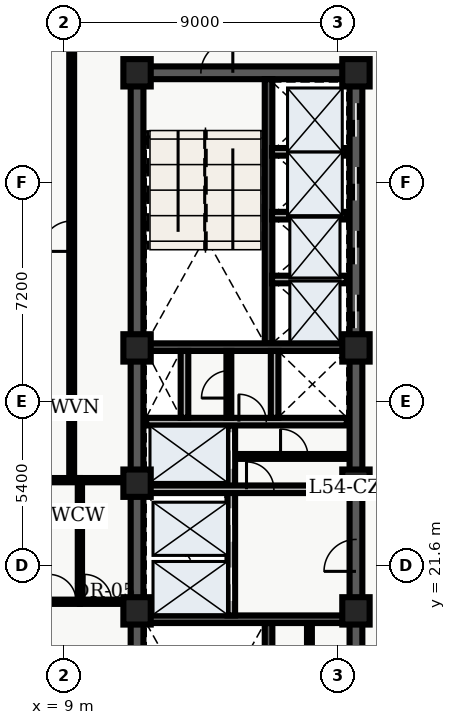
"""IFC4 building model, lengths in metres.
Left out: names, types, materials, properties, quantities, classifications, styles, units other than length and angle.
Written with IfcOpenShell. Run it as: python <this file> out.ifc"""

import sys

from ifc_helpers import new_model, entity, si_unit, converted_unit, direction, frame, origin_with_axes, origin_2d_with_axis, place, context, subcontext, project, spatial, polyline, rectangle, outline, extrude, element, fill, save


model = new_model("IFC4")
c1 = context("Model", 3, precision=1e-05, world=origin_with_axes(), true_north=direction((0.0, 1.0)))
c2 = subcontext(c1, "Body", "Model", "MODEL_VIEW")
j1 = project(units=[si_unit("LENGTHUNIT", "METRE"), converted_unit("PLANEANGLEUNIT", "DEGREE", entity("IfcPlaneAngleMeasure", 0.017), si_unit("PLANEANGLEUNIT", "RADIAN"), dimensions=[0, 0, 0, 0, 0, 0, 0])], contexts=[c1])
p1 = place(None, origin_with_axes())
s1 = spatial("IfcSite", under=j1, at=p1, CompositionType="ELEMENT")
p2 = place(p1, origin_with_axes())
s2 = spatial("IfcBuilding", under=s1, at=p2, CompositionType="ELEMENT")
p3 = place(p2, frame((0.0, 0.0, 219.9), z_axis=(0.0, 0.0, 1.0), x_axis=(1.0, 0.0, 0.0)))
s3 = spatial("IfcBuildingStorey", under=s2, at=p3, CompositionType="ELEMENT", Elevation=219.9)
p4 = place(p3, frame((11.4, 10.8, 0.0), z_axis=(0.0, 0.0, 1.0), x_axis=(0.0, 1.0, 0.0)))
e1 = element("IfcWall", 1, at=p4, inside=s3, PredefinedType="SHEAR", context=c2, shape_type="SweptSolid", body=[
    extrude(outline(polyline([(0.0, -0.21), (27.0, -0.21), (27.0, 0.21), (0.0, 0.21), (0.0, -0.21)])), origin_with_axes(), (0.0, 0.0, 1.0), 4.56),
])
p5 = place(p3, frame((11.4, 37.8, 0.0), z_axis=(0.0, 0.0, 1.0), x_axis=(1.0, 0.0, 0.0)))
e2 = element("IfcWall", 2, at=p5, inside=s3, PredefinedType="SHEAR", context=c2, shape_type="SweptSolid", body=[
    extrude(outline(polyline([(0.0, -0.21), (7.2, -0.21), (7.2, 0.21), (0.0, 0.21), (0.0, -0.21)])), origin_with_axes(), (0.0, 0.0, 1.0), 4.56),
])
p6 = place(p5, frame((2.625, 0.0, 0.0), z_axis=(0.0, 0.0, 1.0), x_axis=(1.0, 0.0, 0.0)))
e3 = element("IfcOpeningElement", 3, at=p6, cuts=e2, PredefinedType="OPENING", context=c2, shape_type="SweptSolid", body=[
    extrude(rectangle(XDim=1.05, YDim=0.44, at=origin_2d_with_axis()), origin_with_axes(), (0.0, 0.0, 1.0), 2.15),
])
p7 = place(p3, frame((18.6, 10.8, 0.0), z_axis=(0.0, 0.0, 1.0), x_axis=(0.0, 1.0, 0.0)))
e4 = element("IfcWall", 4, at=p7, inside=s3, PredefinedType="SHEAR", context=c2, shape_type="SweptSolid", body=[
    extrude(outline(polyline([(0.0, -0.21), (13.5, -0.21), (13.5, 0.21), (0.0, 0.21), (0.0, -0.21)])), origin_with_axes(), (0.0, 0.0, 1.0), 4.56),
])
p8 = place(p7, frame((1.3, 0.0, 0.0), z_axis=(0.0, 0.0, 1.0), x_axis=(1.0, 0.0, 0.0)))
e5 = element("IfcOpeningElement", 5, at=p8, cuts=e4, PredefinedType="OPENING", context=c2, shape_type="SweptSolid", body=[
    extrude(rectangle(XDim=1.1, YDim=0.44, at=origin_2d_with_axis()), origin_with_axes(), (0.0, 0.0, 1.0), 2.15),
])
p9 = place(p7, frame((3.4, 0.0, 0.0), z_axis=(0.0, 0.0, 1.0), x_axis=(1.0, 0.0, 0.0)))
e6 = element("IfcOpeningElement", 6, at=p9, cuts=e4, PredefinedType="OPENING", context=c2, shape_type="SweptSolid", body=[
    extrude(rectangle(XDim=1.1, YDim=0.44, at=origin_2d_with_axis()), origin_with_axes(), (0.0, 0.0, 1.0), 2.15),
])
p10 = place(p7, frame((11.125, 0.0, 0.0), z_axis=(0.0, 0.0, 1.0), x_axis=(1.0, 0.0, 0.0)))
e7 = element("IfcOpeningElement", 7, at=p10, cuts=e4, PredefinedType="OPENING", context=c2, shape_type="SweptSolid", body=[
    extrude(rectangle(XDim=1.05, YDim=0.44, at=origin_2d_with_axis()), origin_with_axes(), (0.0, 0.0, 1.0), 2.15),
])
p11 = place(p7, frame((6.675, 0.0, 0.0), z_axis=(0.0, 0.0, 1.0), x_axis=(1.0, 0.0, 0.0)))
e8 = element("IfcOpeningElement", 8, at=p11, cuts=e4, PredefinedType="OPENING", context=c2, shape_type="SweptSolid", body=[
    extrude(rectangle(XDim=0.95, YDim=0.44, at=origin_2d_with_axis()), origin_with_axes(), (0.0, 0.0, 1.0), 2.15),
])
p12 = place(p3, frame((18.6, 24.3, 0.0), z_axis=(0.0, 0.0, 1.0), x_axis=(0.0, 1.0, 0.0)))
e9 = element("IfcWall", 9, at=p12, inside=s3, PredefinedType="SHEAR", context=c2, shape_type="SweptSolid", body=[
    extrude(outline(polyline([(0.0, -0.21), (13.5, -0.21), (13.5, 0.21), (0.0, 0.21), (0.0, -0.21)])), origin_with_axes(), (0.0, 0.0, 1.0), 4.56),
])
p13 = place(p12, frame((5.65, 0.0, 0.0), z_axis=(0.0, 0.0, 1.0), x_axis=(1.0, 0.0, 0.0)))
e10 = element("IfcOpeningElement", 10, at=p13, cuts=e9, PredefinedType="OPENING", context=c2, shape_type="SweptSolid", body=[
    extrude(rectangle(XDim=1.1, YDim=0.44, at=origin_2d_with_axis()), origin_with_axes(), (0.0, 0.0, 1.0), 2.15),
])
p14 = place(p12, frame((7.75, 0.0, 0.0), z_axis=(0.0, 0.0, 1.0), x_axis=(1.0, 0.0, 0.0)))
e11 = element("IfcOpeningElement", 11, at=p14, cuts=e9, PredefinedType="OPENING", context=c2, shape_type="SweptSolid", body=[
    extrude(rectangle(XDim=1.1, YDim=0.44, at=origin_2d_with_axis()), origin_with_axes(), (0.0, 0.0, 1.0), 2.15),
])
p15 = place(p12, frame((9.85, 0.0, 0.0), z_axis=(0.0, 0.0, 1.0), x_axis=(1.0, 0.0, 0.0)))
e12 = element("IfcOpeningElement", 12, at=p15, cuts=e9, PredefinedType="OPENING", context=c2, shape_type="SweptSolid", body=[
    extrude(rectangle(XDim=1.1, YDim=0.44, at=origin_2d_with_axis()), origin_with_axes(), (0.0, 0.0, 1.0), 2.15),
])
p16 = place(p12, frame((11.95, 0.0, 0.0), z_axis=(0.0, 0.0, 1.0), x_axis=(1.0, 0.0, 0.0)))
e13 = element("IfcOpeningElement", 13, at=p16, cuts=e9, PredefinedType="OPENING", context=c2, shape_type="SweptSolid", body=[
    extrude(rectangle(XDim=1.1, YDim=0.44, at=origin_2d_with_axis()), origin_with_axes(), (0.0, 0.0, 1.0), 2.15),
])
p17 = place(p3, frame((15.725, 11.01, 0.0), z_axis=(0.0, 0.0, 1.0), x_axis=(0.0, 1.0, 0.0)))
e14 = element("IfcWall", 14, at=p17, inside=s3, PredefinedType="SHEAR", context=c2, shape_type="SweptSolid", body=[
    extrude(outline(polyline([(0.0, -0.125), (8.69, -0.125), (8.69, 0.125), (0.0, 0.125), (0.0, -0.125)])), origin_with_axes(), (0.0, 0.0, 1.0), 4.56),
])
p18 = place(p3, frame((11.61, 19.825, 0.0), z_axis=(0.0, 0.0, 1.0), x_axis=(1.0, 0.0, 0.0)))
e15 = element("IfcWall", 15, at=p18, inside=s3, PredefinedType="SHEAR", context=c2, shape_type="SweptSolid", body=[
    extrude(outline(polyline([(0.0, -0.125), (6.78, -0.125), (6.78, 0.125), (0.0, 0.125), (0.0, -0.125)])), origin_with_axes(), (0.0, 0.0, 1.0), 4.56),
])
p19 = place(p3, frame((15.725, 28.9, 0.0), z_axis=(0.0, 0.0, 1.0), x_axis=(0.0, 1.0, 0.0)))
e16 = element("IfcWall", 16, at=p19, inside=s3, PredefinedType="SHEAR", context=c2, shape_type="SweptSolid", body=[
    extrude(outline(polyline([(0.0, -0.125), (8.69, -0.125), (8.69, 0.125), (0.0, 0.125), (0.0, -0.125)])), origin_with_axes(), (0.0, 0.0, 1.0), 4.56),
])
p20 = place(p3, frame((11.61, 28.775, 0.0), z_axis=(0.0, 0.0, 1.0), x_axis=(1.0, 0.0, 0.0)))
e17 = element("IfcWall", 17, at=p20, inside=s3, PredefinedType="SHEAR", context=c2, shape_type="SweptSolid", body=[
    extrude(outline(polyline([(0.0, -0.125), (6.78, -0.125), (6.78, 0.125), (0.0, 0.125), (0.0, -0.125)])), origin_with_axes(), (0.0, 0.0, 1.0), 4.56),
])
p21 = place(p3, frame((14.5, 19.95, 0.0), z_axis=(0.0, 0.0, 1.0), x_axis=(0.0, 1.0, 0.0)))
e18 = element("IfcWall", 18, at=p21, inside=s3, PredefinedType="SOLIDWALL", context=c2, shape_type="SweptSolid", body=[
    extrude(outline(polyline([(0.0, -0.125), (6.25, -0.125), (6.25, 0.125), (0.0, 0.125), (0.0, -0.125)])), origin_with_axes(), (0.0, 0.0, 1.0), 3.6),
])
p22 = place(p21, frame((1.025, 0.0, 0.0), z_axis=(0.0, 0.0, 1.0), x_axis=(1.0, 0.0, 0.0)))
e19 = element("IfcOpeningElement", 19, at=p22, cuts=e18, PredefinedType="OPENING", context=c2, shape_type="SweptSolid", body=[
    extrude(rectangle(XDim=1.1, YDim=0.27, at=origin_2d_with_axis()), origin_with_axes(), (0.0, 0.0, 1.0), 2.15),
])
p23 = place(p21, frame((2.975, 0.0, 0.0), z_axis=(0.0, 0.0, 1.0), x_axis=(1.0, 0.0, 0.0)))
e20 = element("IfcOpeningElement", 20, at=p23, cuts=e18, PredefinedType="OPENING", context=c2, shape_type="SweptSolid", body=[
    extrude(rectangle(XDim=1.1, YDim=0.27, at=origin_2d_with_axis()), origin_with_axes(), (0.0, 0.0, 1.0), 2.15),
])
p24 = place(p21, frame((5.425, 0.0, 0.0), z_axis=(0.0, 0.0, 1.0), x_axis=(1.0, 0.0, 0.0)))
e21 = element("IfcOpeningElement", 21, at=p24, cuts=e18, PredefinedType="OPENING", context=c2, shape_type="SweptSolid", body=[
    extrude(rectangle(XDim=1.2, YDim=0.27, at=origin_2d_with_axis()), origin_with_axes(), (0.0, 0.0, 1.0), 2.15),
])
p25 = place(p3, frame((11.7, 24.1, 0.0), z_axis=(0.0, 0.0, 1.0), x_axis=(1.0, 0.0, 0.0)))
e22 = element("IfcWall", 22, at=p25, inside=s3, PredefinedType="SOLIDWALL", context=c2, shape_type="SweptSolid", body=[
    extrude(outline(polyline([(0.0, -0.125), (6.6, -0.125), (6.6, 0.125), (0.0, 0.125), (0.0, -0.125)])), origin_with_axes(), (0.0, 0.0, 1.0), 3.6),
])
p26 = place(p25, frame((3.75, 0.0, 0.0), z_axis=(0.0, 0.0, 1.0), x_axis=(1.0, 0.0, 0.0)))
e23 = element("IfcOpeningElement", 23, at=p26, cuts=e22, PredefinedType="OPENING", context=c2, shape_type="SweptSolid", body=[
    extrude(rectangle(XDim=0.9, YDim=0.27, at=origin_2d_with_axis()), origin_with_axes(), (0.0, 0.0, 1.0), 2.15),
])
p27 = place(p3, frame((11.7, 26.325, 0.0), z_axis=(0.0, 0.0, 1.0), x_axis=(1.0, 0.0, 0.0)))
e24 = element("IfcWall", 24, at=p27, inside=s3, PredefinedType="SOLIDWALL", context=c2, shape_type="SweptSolid", body=[
    extrude(outline(polyline([(0.0, -0.125), (6.6, -0.125), (6.6, 0.125), (0.0, 0.125), (0.0, -0.125)])), origin_with_axes(), (0.0, 0.0, 1.0), 3.6),
])
p28 = place(p27, frame((3.5, 0.0, 0.0), z_axis=(0.0, 0.0, 1.0), x_axis=(1.0, 0.0, 0.0)))
e25 = element("IfcOpeningElement", 25, at=p28, cuts=e24, PredefinedType="OPENING", context=c2, shape_type="SweptSolid", body=[
    extrude(rectangle(XDim=0.9, YDim=0.27, at=origin_2d_with_axis()), origin_with_axes(), (0.0, 0.0, 1.0), 2.15),
])
for number, where, z_axis, x_axis in (
    (26, (12.96, 26.45, 0.0), (0.0, 0.0, 1.0), (0.0, 1.0, 0.0)),
    (27, (15.925, 26.45, 0.0), (0.0, 0.0, 1.0), (0.0, 1.0, 0.0)),
):
    element("IfcWall", number, at=place(p3, frame(where, z_axis=z_axis, x_axis=x_axis)), inside=s3, PredefinedType="SOLIDWALL", context=c2, shape_type="SweptSolid", body=[
        extrude(outline(polyline([(0.0, -0.125), (2.2, -0.125), (2.2, 0.125), (0.0, 0.125), (0.0, -0.125)])), origin_with_axes(), (0.0, 0.0, 1.0), 3.6),
    ])
for number, where, z_axis, x_axis in (
    (28, (11.4, 20.1, 0.0), (0.0, 0.0, 1.0), (1.0, 0.0, 0.0)),
    (29, (11.4, 24.3, 0.0), (0.0, 0.0, 1.0), (1.0, 0.0, 0.0)),
    (30, (11.4, 28.75, 0.0), (0.0, 0.0, 1.0), (1.0, 0.0, 0.0)),
    (31, (11.4, 37.8, 0.0), (0.0, 0.0, 1.0), (1.0, 0.0, 0.0)),
    (32, (18.6, 20.1, 0.0), (0.0, 0.0, 1.0), (1.0, 0.0, 0.0)),
    (33, (18.6, 24.3, 0.0), (0.0, 0.0, 1.0), (1.0, 0.0, 0.0)),
    (34, (18.6, 28.75, 0.0), (0.0, 0.0, 1.0), (1.0, 0.0, 0.0)),
    (35, (18.6, 37.8, 0.0), (0.0, 0.0, 1.0), (1.0, 0.0, 0.0)),
):
    element("IfcColumn", number, at=place(p3, frame(where, z_axis=z_axis, x_axis=x_axis)), inside=s3, PredefinedType="COLUMN", context=c2, shape_type="SweptSolid", body=[
        extrude(rectangle(XDim=0.9, YDim=0.9, at=origin_2d_with_axis()), origin_with_axes(), (0.0, 0.0, 1.0), 4.8),
    ])
p29 = place(p3, frame((14.62, 25.18, 0.0), z_axis=(0.0, 0.0, 1.0), x_axis=(1.0, 0.0, 0.0)))
e36 = element("IfcWall", 36, at=p29, inside=s3, PredefinedType="PARTITIONING", context=c2, shape_type="SweptSolid", body=[
    extrude(outline(polyline([(0.0, -0.08), (3.68, -0.08), (3.68, 0.08), (0.0, 0.08), (0.0, -0.08)])), origin_with_axes(), (0.0, 0.0, 1.0), 3.2),
])
p30 = place(p29, frame((1.95, 0.0, 0.0), z_axis=(0.0, 0.0, 1.0), x_axis=(1.0, 0.0, 0.0)))
e37 = element("IfcOpeningElement", 37, at=p30, cuts=e36, PredefinedType="OPENING", context=c2, shape_type="SweptSolid", body=[
    extrude(rectangle(XDim=0.9, YDim=0.18, at=origin_2d_with_axis()), origin_with_axes(), (0.0, 0.0, 1.0), 2.15),
])
p31 = place(p3, frame((14.42, 26.45, 0.0), z_axis=(0.0, 0.0, 1.0), x_axis=(0.0, 1.0, 0.0)))
e38 = element("IfcWall", 38, at=p31, inside=s3, PredefinedType="PARTITIONING", context=c2, shape_type="SweptSolid", body=[
    extrude(outline(polyline([(0.0, -0.08), (2.2, -0.08), (2.2, 0.08), (0.0, 0.08), (0.0, -0.08)])), origin_with_axes(), (0.0, 0.0, 1.0), 3.2),
])
p32 = place(p31, frame((1.1, 0.0, 0.0), z_axis=(0.0, 0.0, 1.0), x_axis=(1.0, 0.0, 0.0)))
e39 = element("IfcOpeningElement", 39, at=p32, cuts=e38, PredefinedType="OPENING", context=c2, shape_type="SweptSolid", body=[
    extrude(rectangle(XDim=0.9, YDim=0.18, at=origin_2d_with_axis()), origin_with_axes(), (0.0, 0.0, 1.0), 2.15),
])
p33 = place(p3, frame((17.07, 15.34, 0.0), z_axis=(0.0, 0.0, 1.0), x_axis=(0.0, 1.0, 0.0)))
e40 = element("IfcWall", 40, at=p33, inside=s3, PredefinedType="PARTITIONING", context=c2, shape_type="SweptSolid", body=[
    extrude(outline(polyline([(0.0, -0.08), (4.36, -0.08), (4.36, 0.08), (0.0, 0.08), (0.0, -0.08)])), origin_with_axes(), (0.0, 0.0, 1.0), 3.2),
])
p34 = place(p33, frame((2.05, 0.0, 0.0), z_axis=(0.0, 0.0, 1.0), x_axis=(1.0, 0.0, 0.0)))
e41 = element("IfcOpeningElement", 41, at=p34, cuts=e40, PredefinedType="OPENING", context=c2, shape_type="SweptSolid", body=[
    extrude(rectangle(XDim=0.9, YDim=0.18, at=origin_2d_with_axis()), origin_with_axes(), (0.0, 0.0, 1.0), 2.15),
])
for number, where, z_axis, x_axis in (
    (42, (15.84, 31.0, 0.0), (0.0, 0.0, 1.0), (1.0, 0.0, 0.0)),
    (43, (15.84, 33.1, 0.0), (0.0, 0.0, 1.0), (1.0, 0.0, 0.0)),
    (44, (15.84, 35.2, 0.0), (0.0, 0.0, 1.0), (1.0, 0.0, 0.0)),
):
    element("IfcWall", number, at=place(p3, frame(where, z_axis=z_axis, x_axis=x_axis)), inside=s3, PredefinedType="SOLIDWALL", context=c2, shape_type="SweptSolid", body=[
        extrude(outline(polyline([(0.0, -0.125), (2.46, -0.125), (2.46, 0.125), (0.0, 0.125), (0.0, -0.125)])), origin_with_axes(), (0.0, 0.0, 1.0), 3.2),
    ])
p35 = place(p3, frame((9.52, 20.4, 0.0), z_axis=(0.0, 0.0, 1.0), x_axis=(0.0, 1.0, 0.0)))
e45 = element("IfcWall", 45, at=p35, inside=s3, PredefinedType="PARTITIONING", context=c2, shape_type="SweptSolid", body=[
    extrude(outline(polyline([(0.0, -0.07), (4.0, -0.07), (4.0, 0.07), (0.0, 0.07), (0.0, -0.07)])), origin_with_axes(), (0.0, 0.0, 1.0), 3.2),
])
p36 = place(p3, frame((9.52, 20.4, 0.0), z_axis=(0.0, 0.0, 1.0), x_axis=(1.0, 0.0, 0.0)))
e46 = element("IfcWall", 46, at=p36, inside=s3, PredefinedType="PARTITIONING", context=c2, shape_type="SweptSolid", body=[
    extrude(outline(polyline([(0.0, -0.07), (1.58, -0.07), (1.58, 0.07), (0.0, 0.07), (0.0, -0.07)])), origin_with_axes(), (0.0, 0.0, 1.0), 3.2),
])
p37 = place(p36, frame((0.59, 0.0, 0.0), z_axis=(0.0, 0.0, 1.0), x_axis=(1.0, 0.0, 0.0)))
e47 = element("IfcOpeningElement", 47, at=p37, cuts=e46, PredefinedType="OPENING", context=c2, shape_type="SweptSolid", body=[
    extrude(rectangle(XDim=0.9, YDim=0.16, at=origin_2d_with_axis()), origin_with_axes(), (0.0, 0.0, 1.0), 2.15),
])
p38 = place(p3, frame((9.52, 24.4, 0.0), z_axis=(0.0, 0.0, 1.0), x_axis=(1.0, 0.0, 0.0)))
e48 = element("IfcWall", 48, at=p38, inside=s3, PredefinedType="PARTITIONING", context=c2, shape_type="SweptSolid", body=[
    extrude(outline(polyline([(0.0, -0.07), (1.58, -0.07), (1.58, 0.07), (0.0, 0.07), (0.0, -0.07)])), origin_with_axes(), (0.0, 0.0, 1.0), 3.2),
])
p39 = place(p3, frame((9.25, 24.4, 0.0), z_axis=(0.0, 0.0, 1.0), x_axis=(0.0, 1.0, 0.0)))
e49 = element("IfcWall", 49, at=p39, inside=s3, PredefinedType="PARTITIONING", context=c2, shape_type="SweptSolid", body=[
    extrude(outline(polyline([(0.0, -0.08), (16.1, -0.08), (16.1, 0.08), (0.0, 0.08), (0.0, -0.08)])), origin_with_axes(), (0.0, 0.0, 1.0), 3.2),
])
p40 = place(p39, frame((8.025, 0.0, 0.0), z_axis=(0.0, 0.0, 1.0), x_axis=(1.0, 0.0, 0.0)))
e50 = element("IfcOpeningElement", 50, at=p40, cuts=e49, PredefinedType="OPENING", context=c2, shape_type="SweptSolid", body=[
    extrude(rectangle(XDim=1.0, YDim=0.18, at=origin_2d_with_axis()), origin_with_axes(), (0.0, 0.0, 1.0), 2.15),
])
p41 = place(p3, frame((4.835, 20.4, 0.0), z_axis=(0.0, 0.0, 1.0), x_axis=(1.0, 0.0, 0.0)))
e51 = element("IfcWall", 51, at=p41, inside=s3, PredefinedType="PARTITIONING", context=c2, shape_type="SweptSolid", body=[
    extrude(outline(polyline([(0.0, -0.07), (4.685, -0.07), (4.685, 0.07), (0.0, 0.07), (0.0, -0.07)])), origin_with_axes(), (0.0, 0.0, 1.0), 3.2),
])
p42 = place(p41, frame((4.115, 0.0, 0.0), z_axis=(0.0, 0.0, 1.0), x_axis=(1.0, 0.0, 0.0)))
e52 = element("IfcOpeningElement", 52, at=p42, cuts=e51, PredefinedType="OPENING", context=c2, shape_type="SweptSolid", body=[
    extrude(rectangle(XDim=0.9, YDim=0.16, at=origin_2d_with_axis()), origin_with_axes(), (0.0, 0.0, 1.0), 2.15),
])
p43 = place(p3, frame((4.835, 24.4, 0.0), z_axis=(0.0, 0.0, 1.0), x_axis=(1.0, 0.0, 0.0)))
e53 = element("IfcWall", 53, at=p43, inside=s3, PredefinedType="PARTITIONING", context=c2, shape_type="SweptSolid", body=[
    extrude(outline(polyline([(0.0, -0.07), (4.685, -0.07), (4.685, 0.07), (0.0, 0.07), (0.0, -0.07)])), origin_with_axes(), (0.0, 0.0, 1.0), 3.2),
])
p44 = place(p12, frame((5.65, 0.0, 0.0), z_axis=(0.0, 0.0, 1.0), x_axis=(1.0, 0.0, 0.0)))
e54 = element("IfcDoor", 54, at=p44, inside=s3, OperationType="SLIDING_TO_LEFT", PredefinedType="DOOR", context=c2, shape_type="SweptSolid", body=[
    extrude(rectangle(XDim=1.1, YDim=0.09, at=origin_2d_with_axis()), origin_with_axes(), (0.0, 0.0, 1.0), 2.15),
])
fill(e10, e54)
p45 = place(p12, frame((7.75, 0.0, 0.0), z_axis=(0.0, 0.0, 1.0), x_axis=(1.0, 0.0, 0.0)))
e55 = element("IfcDoor", 55, at=p45, inside=s3, OperationType="SLIDING_TO_RIGHT", PredefinedType="DOOR", context=c2, shape_type="SweptSolid", body=[
    extrude(rectangle(XDim=1.1, YDim=0.09, at=origin_2d_with_axis()), origin_with_axes(), (0.0, 0.0, 1.0), 2.15),
])
fill(e11, e55)
p46 = place(p12, frame((9.85, 0.0, 0.0), z_axis=(0.0, 0.0, 1.0), x_axis=(1.0, 0.0, 0.0)))
e56 = element("IfcDoor", 56, at=p46, inside=s3, OperationType="DOUBLE_DOOR_SLIDING", PredefinedType="DOOR", context=c2, shape_type="SweptSolid", body=[
    extrude(rectangle(XDim=1.1, YDim=0.09, at=origin_2d_with_axis()), origin_with_axes(), (0.0, 0.0, 1.0), 2.15),
])
fill(e12, e56)
p47 = place(p12, frame((11.95, 0.0, 0.0), z_axis=(0.0, 0.0, 1.0), x_axis=(1.0, 0.0, 0.0)))
e57 = element("IfcDoor", 57, at=p47, inside=s3, OperationType="DOUBLE_DOOR_SLIDING", PredefinedType="DOOR", context=c2, shape_type="SweptSolid", body=[
    extrude(rectangle(XDim=1.1, YDim=0.09, at=origin_2d_with_axis()), origin_with_axes(), (0.0, 0.0, 1.0), 2.15),
])
fill(e13, e57)
p48 = place(p21, frame((1.025, 0.0, 0.0), z_axis=(0.0, 0.0, 1.0), x_axis=(1.0, 0.0, 0.0)))
e58 = element("IfcDoor", 58, at=p48, inside=s3, OperationType="SLIDING_TO_LEFT", PredefinedType="DOOR", context=c2, shape_type="SweptSolid", body=[
    extrude(rectangle(XDim=1.1, YDim=0.09, at=origin_2d_with_axis()), origin_with_axes(), (0.0, 0.0, 1.0), 2.15),
])
fill(e19, e58)
p49 = place(p21, frame((2.975, 0.0, 0.0), z_axis=(0.0, 0.0, 1.0), x_axis=(1.0, 0.0, 0.0)))
e59 = element("IfcDoor", 59, at=p49, inside=s3, OperationType="SLIDING_TO_RIGHT", PredefinedType="DOOR", context=c2, shape_type="SweptSolid", body=[
    extrude(rectangle(XDim=1.1, YDim=0.09, at=origin_2d_with_axis()), origin_with_axes(), (0.0, 0.0, 1.0), 2.15),
])
fill(e20, e59)
p50 = place(p21, frame((5.425, 0.0, 0.0), z_axis=(0.0, 0.0, 1.0), x_axis=(1.0, 0.0, 0.0)))
e60 = element("IfcDoor", 60, at=p50, inside=s3, OperationType="DOUBLE_DOOR_SLIDING", PredefinedType="DOOR", context=c2, shape_type="SweptSolid", body=[
    extrude(rectangle(XDim=1.2, YDim=0.09, at=origin_2d_with_axis()), origin_with_axes(), (0.0, 0.0, 1.0), 2.15),
])
fill(e21, e60)
p51 = place(p5, frame((2.625, 0.0, 0.0), z_axis=(0.0, 0.0, 1.0), x_axis=(1.0, 0.0, 0.0)))
e61 = element("IfcDoor", 61, at=p51, inside=s3, OperationType="SINGLE_SWING_RIGHT", PredefinedType="DOOR", context=c2, shape_type="SweptSolid", body=[
    extrude(rectangle(XDim=1.05, YDim=0.09, at=origin_2d_with_axis()), origin_with_axes(), (0.0, 0.0, 1.0), 2.15),
])
fill(e3, e61)
p52 = place(p7, frame((11.125, 0.0, 0.0), z_axis=(0.0, 0.0, 1.0), x_axis=(1.0, 0.0, 0.0)))
e62 = element("IfcDoor", 62, at=p52, inside=s3, OperationType="SINGLE_SWING_LEFT", PredefinedType="DOOR", context=c2, shape_type="SweptSolid", body=[
    extrude(rectangle(XDim=1.05, YDim=0.09, at=origin_2d_with_axis()), origin_with_axes(), (0.0, 0.0, 1.0), 2.15),
])
fill(e7, e62)
p53 = place(p27, frame((3.5, 0.0, 0.0), z_axis=(0.0, 0.0, 1.0), x_axis=(1.0, 0.0, 0.0)))
e63 = element("IfcDoor", 63, at=p53, inside=s3, OperationType="SINGLE_SWING_LEFT", PredefinedType="DOOR", context=c2, shape_type="SweptSolid", body=[
    extrude(rectangle(XDim=0.9, YDim=0.09, at=origin_2d_with_axis()), origin_with_axes(), (0.0, 0.0, 1.0), 2.15),
])
fill(e25, e63)
p54 = place(p31, frame((1.1, 0.0, 0.0), z_axis=(0.0, 0.0, 1.0), x_axis=(1.0, 0.0, 0.0)))
e64 = element("IfcDoor", 64, at=p54, inside=s3, OperationType="SINGLE_SWING_LEFT", PredefinedType="DOOR", context=c2, shape_type="SweptSolid", body=[
    extrude(rectangle(XDim=0.9, YDim=0.09, at=origin_2d_with_axis()), origin_with_axes(), (0.0, 0.0, 1.0), 2.15),
])
fill(e39, e64)
p55 = place(p25, frame((3.75, 0.0, 0.0), z_axis=(0.0, 0.0, 1.0), x_axis=(1.0, 0.0, 0.0)))
e65 = element("IfcDoor", 65, at=p55, inside=s3, OperationType="SINGLE_SWING_LEFT", PredefinedType="DOOR", context=c2, shape_type="SweptSolid", body=[
    extrude(rectangle(XDim=0.9, YDim=0.09, at=origin_2d_with_axis()), origin_with_axes(), (0.0, 0.0, 1.0), 2.15),
])
fill(e23, e65)
p56 = place(p29, frame((1.95, 0.0, 0.0), z_axis=(0.0, 0.0, 1.0), x_axis=(1.0, 0.0, 0.0)))
e66 = element("IfcDoor", 66, at=p56, inside=s3, OperationType="SINGLE_SWING_LEFT", PredefinedType="DOOR", context=c2, shape_type="SweptSolid", body=[
    extrude(rectangle(XDim=0.9, YDim=0.09, at=origin_2d_with_axis()), origin_with_axes(), (0.0, 0.0, 1.0), 2.15),
])
fill(e37, e66)
p57 = place(p36, frame((0.59, 0.0, 0.0), z_axis=(0.0, 0.0, 1.0), x_axis=(1.0, 0.0, 0.0)))
e67 = element("IfcDoor", 67, at=p57, inside=s3, OperationType="SINGLE_SWING_LEFT", PredefinedType="DOOR", context=c2, shape_type="SweptSolid", body=[
    extrude(rectangle(XDim=0.9, YDim=0.084, at=origin_2d_with_axis()), origin_with_axes(), (0.0, 0.0, 1.0), 2.15),
])
fill(e47, e67)
p58 = place(p41, frame((4.115, 0.0, 0.0), z_axis=(0.0, 0.0, 1.0), x_axis=(1.0, 0.0, 0.0)))
e68 = element("IfcDoor", 68, at=p58, inside=s3, OperationType="SINGLE_SWING_LEFT", PredefinedType="DOOR", context=c2, shape_type="SweptSolid", body=[
    extrude(rectangle(XDim=0.9, YDim=0.084, at=origin_2d_with_axis()), origin_with_axes(), (0.0, 0.0, 1.0), 2.15),
])
fill(e52, e68)
p59 = place(p39, frame((8.025, 0.0, 0.0), z_axis=(0.0, 0.0, 1.0), x_axis=(1.0, 0.0, 0.0)))
e69 = element("IfcDoor", 69, at=p59, inside=s3, OperationType="SINGLE_SWING_LEFT", PredefinedType="DOOR", context=c2, shape_type="SweptSolid", body=[
    extrude(rectangle(XDim=1.0, YDim=0.09, at=origin_2d_with_axis()), origin_with_axes(), (0.0, 0.0, 1.0), 2.15),
])
fill(e50, e69)
save(model, sys.argv[1])
